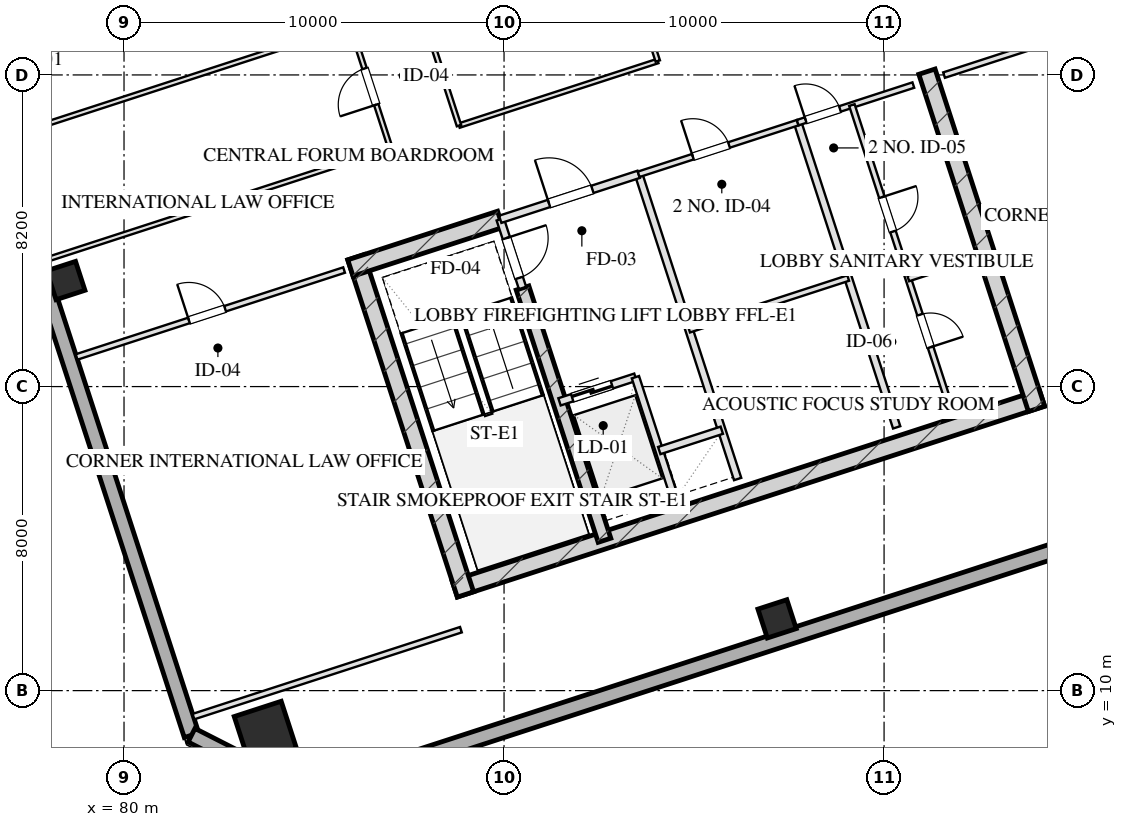
"""IFC4 building model, lengths in metres.
Left out: names, types, materials, properties, quantities, classifications, styles, units other than length and angle.
Written with IfcOpenShell. Run it as: python <this file> out.ifc"""

import sys

from ifc_helpers import new_model, si_unit, direction, frame, frame_2d, origin, origin_2d, place, context, subcontext, project, spatial, rectangle, hollow_rectangle, extrude, element, fill, save


model = new_model("IFC4")
c1 = context("Model", 3, precision=1e-05, world=origin(), true_north=direction((0.0, 1.0)))
c2 = subcontext(c1, "Body", "Model", "MODEL_VIEW")
j1 = project(units=[si_unit("LENGTHUNIT", "METRE"), si_unit("PLANEANGLEUNIT", "RADIAN")], contexts=[c1])
p1 = place(None, origin())
s1 = spatial("IfcSite", under=j1, at=p1, CompositionType="ELEMENT")
p2 = place(p1, origin())
s2 = spatial("IfcBuilding", under=s1, at=p2, CompositionType="ELEMENT")
p3 = place(p2, frame((0.0, 0.0, 188.6)))
s3 = spatial("IfcBuildingStorey", under=s2, at=p3, CompositionType="ELEMENT", Elevation=188.6)
p4 = place(p3, frame((88.701, 12.675, 0.0), z_axis=(0.0, 0.0, 1.0), x_axis=(0.95105824505, 0.309011673763, 0.0)))
e1 = element("IfcWall", 1, at=p4, inside=s3, PredefinedType="SHEAR", context=c2, shape_type="SweptSolid", body=[
    extrude(rectangle(XDim=16.25, YDim=0.45, at=frame_2d((8.125, 0.0))), origin(), (0.0, 0.0, 1.0), 3.45),
])
for number, where, z_axis, x_axis in (
    (2, (86.102, 21.404, 0.0), (0.0, 0.0, 1.0), (0.309, -0.951, 0.0)),
    (3, (101.128, 26.286, 0.0), (0.0, 0.0, 1.0), (0.309, -0.951, 0.0)),
):
    element("IfcWall", number, at=place(p3, frame(where, z_axis=z_axis, x_axis=x_axis)), inside=s3, PredefinedType="SHEAR", context=c2, shape_type="SweptSolid", body=[
        extrude(rectangle(XDim=9.33, YDim=0.45, at=frame_2d((4.665, 0.0))), origin(), (0.0, 0.0, 1.0), 3.45),
    ])
p5 = place(p3, frame((90.486, 20.594, 0.0), z_axis=(0.0, 0.0, 1.0), x_axis=(0.309020428229, -0.951055400562, 0.0)))
e4 = element("IfcWall", 4, at=p5, inside=s3, PredefinedType="SHEAR", context=c2, shape_type="SweptSolid", body=[
    extrude(rectangle(XDim=6.98, YDim=0.35, at=frame_2d((3.49, 0.0))), origin(), (0.0, 0.0, 1.0), 3.45),
])
p6 = place(p3, frame((85.957, 21.12, 0.0), z_axis=(0.0, 0.0, 1.0), x_axis=(0.951064796122, 0.308991510526, 0.0)))
e5 = element("IfcWall", 5, at=p6, inside=s3, PredefinedType="SHEAR", context=c2, shape_type="SweptSolid", body=[
    extrude(rectangle(XDim=4.145, YDim=0.45, at=frame_2d((2.073, 0.0))), origin(), (0.0, 0.0, 1.0), 3.45),
])
p7 = place(p3, frame((83.719, 8.901, 0.0), z_axis=(0.0, 0.0, 1.0), x_axis=(0.951056516295, 0.309016994375, 0.0)))
e6 = element("IfcColumn", 6, at=p7, inside=s3, PredefinedType="COLUMN", context=c2, shape_type="SweptSolid", body=[
    extrude(hollow_rectangle(XDim=1.3, YDim=1.3, WallThickness=0.045, at=origin_2d()), origin(), (0.0, 0.0, 1.0), 3.451),
])
for number, where, z_axis, x_axis in (
    (7, (78.468, 20.79, 0.0), (0.0, 0.0, 1.0), (0.951, 0.309, 0.0)),
    (8, (97.185, 11.888, 0.0), (0.0, 0.0, 1.0), (0.951, 0.309, 0.0)),
):
    element("IfcColumn", number, at=place(p3, frame(where, z_axis=z_axis, x_axis=x_axis)), inside=s3, PredefinedType="COLUMN", context=c2, shape_type="SweptSolid", body=[
        extrude(hollow_rectangle(XDim=0.8, YDim=0.8, WallThickness=0.028, at=origin_2d()), origin(), (0.0, 0.0, 1.0), 3.451),
    ])
p8 = place(p3, frame((81.776, 8.827, 0.0), z_axis=(0.0, 0.0, 1.0), x_axis=(-0.309014228706, 0.951057414911, 0.0)))
e9 = element("IfcWall", 9, at=p8, inside=s3, PredefinedType="SOLIDWALL", context=c2, shape_type="SweptSolid", body=[
    extrude(rectangle(XDim=42.8, YDim=0.4, at=frame_2d((21.4, 0.0))), origin(), (0.0, 0.0, 1.0), 2.61),
])
p9 = place(p8, frame((22.95, 0.0, 0.75)))
e10 = element("IfcOpeningElement", 10, at=p9, cuts=e9, PredefinedType="OPENING", context=c2, shape_type="SweptSolid", body=[
    extrude(rectangle(XDim=2.1, YDim=1.46, at=frame_2d((1.05, 0.73))), frame((0.0, 0.21, 0.0), z_axis=(0.0, -1.0, 0.0), x_axis=(1.0, 0.0, 0.0)), (0.0, 0.0, 1.0), 0.42),
])
p10 = place(p8, frame((26.75, 0.0, 0.75)))
e11 = element("IfcOpeningElement", 11, at=p10, cuts=e9, PredefinedType="OPENING", context=c2, shape_type="SweptSolid", body=[
    extrude(rectangle(XDim=2.1, YDim=1.46, at=frame_2d((1.05, 0.73))), frame((0.0, 0.21, 0.0), z_axis=(0.0, -1.0, 0.0), x_axis=(1.0, 0.0, 0.0)), (0.0, 0.0, 1.0), 0.42),
])
p11 = place(p8, frame((17.787, 0.0, 0.0)))
e12 = element("IfcOpeningElement", 12, at=p11, cuts=e9, PredefinedType="OPENING", context=c2, shape_type="SweptSolid", body=[
    extrude(rectangle(XDim=1.1, YDim=2.15, at=frame_2d((0.55, 1.075))), frame((0.0, 0.21, 0.0), z_axis=(0.0, -1.0, 0.0), x_axis=(1.0, 0.0, 0.0)), (0.0, 0.0, 1.0), 0.42),
])
p12 = place(p3, frame((98.224, 59.173, 0.0), z_axis=(0.0, 0.0, 1.0), x_axis=(0.309014228706, -0.951057414911, 0.0)))
e13 = element("IfcWall", 13, at=p12, inside=s3, PredefinedType="SOLIDWALL", context=c2, shape_type="SweptSolid", body=[
    extrude(rectangle(XDim=42.8, YDim=0.4, at=frame_2d((21.4, 0.0))), origin(), (0.0, 0.0, 1.0), 2.61),
])
p13 = place(p12, frame((17.75, 0.0, 0.75)))
e14 = element("IfcOpeningElement", 14, at=p13, cuts=e13, PredefinedType="OPENING", context=c2, shape_type="SweptSolid", body=[
    extrude(rectangle(XDim=2.1, YDim=1.46, at=frame_2d((1.05, 0.73))), frame((0.0, 0.21, 0.0), z_axis=(0.0, -1.0, 0.0), x_axis=(1.0, 0.0, 0.0)), (0.0, 0.0, 1.0), 0.42),
])
p14 = place(p12, frame((13.95, 0.0, 0.75)))
e15 = element("IfcOpeningElement", 15, at=p14, cuts=e13, PredefinedType="OPENING", context=c2, shape_type="SweptSolid", body=[
    extrude(rectangle(XDim=2.1, YDim=1.46, at=frame_2d((1.05, 0.73))), frame((0.0, 0.21, 0.0), z_axis=(0.0, -1.0, 0.0), x_axis=(1.0, 0.0, 0.0)), (0.0, 0.0, 1.0), 0.42),
])
p15 = place(p12, frame((23.95, 0.0, 0.0)))
e16 = element("IfcOpeningElement", 16, at=p15, cuts=e13, PredefinedType="OPENING", context=c2, shape_type="SweptSolid", body=[
    extrude(rectangle(XDim=1.1, YDim=2.15, at=frame_2d((0.55, 1.075))), frame((0.0, 0.21, 0.0), z_axis=(0.0, -1.0, 0.0), x_axis=(1.0, 0.0, 0.0)), (0.0, 0.0, 1.0), 0.42),
])
p16 = place(p3, frame((109.908, 15.444, 0.0), z_axis=(0.0, 0.0, 1.0), x_axis=(-0.951057580055, -0.30901372044, 0.0)))
e17 = element("IfcWall", 17, at=p16, inside=s3, PredefinedType="SOLIDWALL", context=c2, shape_type="SweptSolid", body=[
    extrude(rectangle(XDim=26.4, YDim=0.4, at=frame_2d((13.2, 0.0))), origin(), (0.0, 0.0, 1.0), 2.61),
])
p17 = place(p3, frame((84.801, 7.286, 0.0), z_axis=(0.0, 0.0, 1.0), x_axis=(-0.891020832027, 0.453962417932, 0.0)))
e18 = element("IfcWall", 18, at=p17, inside=s3, PredefinedType="SOLIDWALL", context=c2, shape_type="SweptSolid", body=[
    extrude(rectangle(XDim=3.394, YDim=0.4, at=frame_2d((1.697, 0.0))), origin(), (0.0, 0.0, 1.0), 2.61),
])
p18 = place(p3, frame((89.899, 22.401, 0.0), z_axis=(0.0, 0.0, 1.0), x_axis=(0.308932062672, -0.951084108086, 0.0)))
e19 = element("IfcWall", 19, at=p18, inside=s3, PredefinedType="PARTITIONING", context=c2, shape_type="SweptSolid", body=[
    extrude(rectangle(XDim=1.9, YDim=0.2, at=frame_2d((0.95, 0.0))), origin(), (0.0, 0.0, 1.0), 3.175),
])
p19 = place(p18, frame((0.52, 0.0, 0.0)))
e20 = element("IfcOpeningElement", 20, at=p19, cuts=e19, PredefinedType="OPENING", context=c2, shape_type="SweptSolid", body=[
    extrude(rectangle(XDim=1.1, YDim=2.05, at=frame_2d((0.55, 1.025))), frame((0.0, 0.11, 0.0), z_axis=(0.0, -1.0, 0.0), x_axis=(1.0, 0.0, 0.0)), (0.0, 0.0, 1.0), 0.22),
])
p20 = place(p3, frame((93.542, 23.585, 0.0), z_axis=(0.0, 0.0, 1.0), x_axis=(0.309042196757, -0.951048327176, 0.0)))
e21 = element("IfcWall", 21, at=p20, inside=s3, PredefinedType="PARTITIONING", context=c2, shape_type="SweptSolid", body=[
    extrude(rectangle(XDim=8.43, YDim=0.2, at=frame_2d((4.215, 0.0))), origin(), (0.0, 0.0, 1.0), 3.175),
])
p21 = place(p3, frame((89.899, 22.401, 0.0), z_axis=(0.0, 0.0, 1.0), x_axis=(0.951046716504, 0.309047153403, 0.0)))
e22 = element("IfcWall", 22, at=p21, inside=s3, PredefinedType="PARTITIONING", context=c2, shape_type="SweptSolid", body=[
    extrude(rectangle(XDim=3.83, YDim=0.2, at=frame_2d((1.915, 0.0))), origin(), (0.0, 0.0, 1.0), 3.175),
])
p22 = place(p21, frame((1.35, 0.0, 0.0)))
e23 = element("IfcOpeningElement", 23, at=p22, cuts=e22, PredefinedType="OPENING", context=c2, shape_type="SweptSolid", body=[
    extrude(rectangle(XDim=1.2, YDim=2.05, at=frame_2d((0.6, 1.025))), frame((0.0, 0.11, 0.0), z_axis=(0.0, -1.0, 0.0), x_axis=(1.0, 0.0, 0.0)), (0.0, 0.0, 1.0), 0.22),
])
p23 = place(p3, frame((91.46, 17.598, 0.0), z_axis=(0.0, 0.0, 1.0), x_axis=(0.951062257173, 0.308999325213, 0.0)))
e24 = element("IfcWall", 24, at=p23, inside=s3, PredefinedType="PARTITIONING", context=c2, shape_type="SweptSolid", body=[
    extrude(rectangle(XDim=2.1, YDim=0.2, at=frame_2d((1.05, 0.0))), origin(), (0.0, 0.0, 1.0), 3.175),
])
p24 = place(p23, frame((0.35, 0.0, 0.0)))
e25 = element("IfcOpeningElement", 25, at=p24, cuts=e24, PredefinedType="OPENING", context=c2, shape_type="SweptSolid", body=[
    extrude(rectangle(XDim=1.1, YDim=2.05, at=frame_2d((0.55, 1.025))), frame((0.0, 0.11, 0.0), z_axis=(0.0, -1.0, 0.0), x_axis=(1.0, 0.0, 0.0)), (0.0, 0.0, 1.0), 0.22),
])
p25 = place(p3, frame((93.457, 18.247, 0.0), z_axis=(0.0, 0.0, 1.0), x_axis=(0.3089935693, -0.951064127245, 0.0)))
e26 = element("IfcWall", 26, at=p25, inside=s3, PredefinedType="PARTITIONING", context=c2, shape_type="SweptSolid", body=[
    extrude(rectangle(XDim=3.7, YDim=0.2, at=frame_2d((1.85, 0.0))), origin(), (0.0, 0.0, 1.0), 3.175),
])
p26 = place(p3, frame((94.084, 16.317, 0.0), z_axis=(0.0, 0.0, 1.0), x_axis=(0.951041328149, 0.309063734775, 0.0)))
e27 = element("IfcWall", 27, at=p26, inside=s3, PredefinedType="PARTITIONING", context=c2, shape_type="SweptSolid", body=[
    extrude(rectangle(XDim=1.73, YDim=0.2, at=frame_2d((0.865, 0.0))), origin(), (0.0, 0.0, 1.0), 3.175),
])
p27 = place(p3, frame((97.727, 24.944, 0.0), z_axis=(0.0, 0.0, 1.0), x_axis=(0.309016001439, -0.951056838919, 0.0)))
e28 = element("IfcWall", 28, at=p27, inside=s3, PredefinedType="PARTITIONING", context=c2, shape_type="SweptSolid", body=[
    extrude(rectangle(XDim=8.43, YDim=0.2, at=frame_2d((4.215, 0.0))), origin(), (0.0, 0.0, 1.0), 3.175),
])
p28 = place(p3, frame((93.542, 23.585, 0.0), z_axis=(0.0, 0.0, 1.0), x_axis=(0.951063829732, 0.308994485023, 0.0)))
e29 = element("IfcWall", 29, at=p28, inside=s3, PredefinedType="PARTITIONING", context=c2, shape_type="SweptSolid", body=[
    extrude(rectangle(XDim=4.4, YDim=0.15, at=frame_2d((2.2, 0.0))), origin(), (0.0, 0.0, 1.0), 3.175),
])
p29 = place(p28, frame((1.5, 0.0, 0.0)))
e30 = element("IfcOpeningElement", 30, at=p29, cuts=e29, PredefinedType="OPENING", context=c2, shape_type="SweptSolid", body=[
    extrude(rectangle(XDim=1.0, YDim=2.05, at=frame_2d((0.5, 1.025))), frame((0.0, 0.085, 0.0), z_axis=(0.0, -1.0, 0.0), x_axis=(1.0, 0.0, 0.0)), (0.0, 0.0, 1.0), 0.17),
])
p30 = place(p3, frame((94.871, 19.495, 0.0), z_axis=(0.0, 0.0, 1.0), x_axis=(0.951042223598, 0.309060979314, 0.0)))
e31 = element("IfcWall", 31, at=p30, inside=s3, PredefinedType="PARTITIONING", context=c2, shape_type="SweptSolid", body=[
    extrude(rectangle(XDim=4.4, YDim=0.15, at=frame_2d((2.2, 0.0))), origin(), (0.0, 0.0, 1.0), 3.175),
])
p31 = place(p3, frame((97.727, 24.944, 0.0), z_axis=(0.0, 0.0, 1.0), x_axis=(0.951036872128, 0.309077446369, 0.0)))
e32 = element("IfcWall", 32, at=p31, inside=s3, PredefinedType="PARTITIONING", context=c2, shape_type="SweptSolid", body=[
    extrude(rectangle(XDim=3.2, YDim=0.15, at=frame_2d((1.6, 0.0))), origin(), (0.0, 0.0, 1.0), 3.175),
])
p32 = place(p31, frame((0.22, 0.0, 0.0)))
e33 = element("IfcOpeningElement", 33, at=p32, cuts=e32, PredefinedType="OPENING", context=c2, shape_type="SweptSolid", body=[
    extrude(rectangle(XDim=0.95, YDim=2.05, at=frame_2d((0.475, 1.025))), frame((0.0, 0.085, 0.0), z_axis=(0.0, -1.0, 0.0), x_axis=(1.0, 0.0, 0.0)), (0.0, 0.0, 1.0), 0.17),
])
p33 = place(p3, frame((99.153, 25.408, 0.0), z_axis=(0.0, 0.0, 1.0), x_axis=(0.309016001439, -0.951056838919, 0.0)))
e34 = element("IfcWall", 34, at=p33, inside=s3, PredefinedType="PARTITIONING", context=c2, shape_type="SweptSolid", body=[
    extrude(rectangle(XDim=8.43, YDim=0.15, at=frame_2d((4.215, 0.0))), origin(), (0.0, 0.0, 1.0), 3.175),
])
p34 = place(p33, frame((2.55, 0.0, 0.0)))
e35 = element("IfcOpeningElement", 35, at=p34, cuts=e34, PredefinedType="OPENING", context=c2, shape_type="SweptSolid", body=[
    extrude(rectangle(XDim=0.95, YDim=2.05, at=frame_2d((0.475, 1.025))), frame((0.0, 0.085, 0.0), z_axis=(0.0, -1.0, 0.0), x_axis=(1.0, 0.0, 0.0)), (0.0, 0.0, 1.0), 0.17),
])
p35 = place(p33, frame((5.8, 0.0, 0.0)))
e36 = element("IfcOpeningElement", 36, at=p35, cuts=e34, PredefinedType="OPENING", context=c2, shape_type="SweptSolid", body=[
    extrude(rectangle(XDim=0.9, YDim=2.05, at=frame_2d((0.45, 1.025))), frame((0.0, 0.085, 0.0), z_axis=(0.0, -1.0, 0.0), x_axis=(1.0, 0.0, 0.0)), (0.0, 0.0, 1.0), 0.17),
])
p36 = place(p3, frame((100.636, 20.843, 0.0), z_axis=(0.0, 0.0, 1.0), x_axis=(0.951040401051, 0.309066587596, 0.0)))
e37 = element("IfcWall", 37, at=p36, inside=s3, PredefinedType="PARTITIONING", context=c2, shape_type="SweptSolid", body=[
    extrude(rectangle(XDim=1.7, YDim=0.15, at=frame_2d((0.85, 0.0))), origin(), (0.0, 0.0, 1.0), 3.175),
])
p37 = place(p3, frame((81.828, 9.316, 0.0), z_axis=(0.0, 0.0, 1.0), x_axis=(0.95105128112, 0.309033106124, 0.0)))
e38 = element("IfcWall", 38, at=p37, inside=s3, PredefinedType="PARTITIONING", context=c2, shape_type="SweptSolid", body=[
    extrude(rectangle(XDim=7.4, YDim=0.15, at=frame_2d((3.7, 0.0))), origin(), (0.0, 0.0, 1.0), 3.175),
])
p38 = place(p3, frame((78.753, 18.78, 0.0), z_axis=(0.0, 0.0, 1.0), x_axis=(0.951060977215, 0.309003264738, 0.0)))
e39 = element("IfcWall", 39, at=p38, inside=s3, PredefinedType="PARTITIONING", context=c2, shape_type="SweptSolid", body=[
    extrude(rectangle(XDim=7.4, YDim=0.15, at=frame_2d((3.7, 0.0))), origin(), (0.0, 0.0, 1.0), 3.175),
])
p39 = place(p38, frame((3.108, 0.0, 0.0)))
e40 = element("IfcOpeningElement", 40, at=p39, cuts=e39, PredefinedType="OPENING", context=c2, shape_type="SweptSolid", body=[
    extrude(rectangle(XDim=1.0, YDim=2.05, at=frame_2d((0.5, 1.025))), frame((0.0, 0.085, 0.0), z_axis=(0.0, -1.0, 0.0), x_axis=(1.0, 0.0, 0.0)), (0.0, 0.0, 1.0), 0.17),
])
p40 = place(p3, frame((101.578, 26.196, 0.0), z_axis=(0.0, 0.0, 1.0), x_axis=(0.951064934653, 0.308991084134, 0.0)))
e41 = element("IfcWall", 41, at=p40, inside=s3, PredefinedType="PARTITIONING", context=c2, shape_type="SweptSolid", body=[
    extrude(rectangle(XDim=6.8, YDim=0.15, at=frame_2d((3.4, 0.0))), origin(), (0.0, 0.0, 1.0), 3.175),
])
p41 = place(p40, frame((2.856, 0.0, 0.0)))
e42 = element("IfcOpeningElement", 42, at=p41, cuts=e41, PredefinedType="OPENING", context=c2, shape_type="SweptSolid", body=[
    extrude(rectangle(XDim=1.0, YDim=2.05, at=frame_2d((0.5, 1.025))), frame((0.0, 0.085, 0.0), z_axis=(0.0, -1.0, 0.0), x_axis=(1.0, 0.0, 0.0)), (0.0, 0.0, 1.0), 0.17),
])
p42 = place(p3, frame((77.925, 21.328, 0.0), z_axis=(0.0, 0.0, 1.0), x_axis=(0.951053980838, 0.309024797601, 0.0)))
e43 = element("IfcWall", 43, at=p42, inside=s3, PredefinedType="PARTITIONING", context=c2, shape_type="SweptSolid", body=[
    extrude(rectangle(XDim=9.55, YDim=0.12, at=frame_2d((4.775, 0.0))), origin(), (0.0, 0.0, 1.0), 3.175),
])
p43 = place(p3, frame((88.814, 24.867, 0.0), z_axis=(0.0, 0.0, 1.0), x_axis=(0.951061793147, 0.309000753423, 0.0)))
e44 = element("IfcWall", 44, at=p43, inside=s3, PredefinedType="PARTITIONING", context=c2, shape_type="SweptSolid", body=[
    extrude(rectangle(XDim=5.5, YDim=0.12, at=frame_2d((2.75, 0.0))), origin(), (0.0, 0.0, 1.0), 3.175),
])
p44 = place(p3, frame((87.007, 24.28, 0.0), z_axis=(0.0, 0.0, 1.0), x_axis=(-0.309022042254, 0.951054876125, 0.0)))
e45 = element("IfcWall", 45, at=p44, inside=s3, PredefinedType="PARTITIONING", context=c2, shape_type="SweptSolid", body=[
    extrude(rectangle(XDim=16.64, YDim=0.12, at=frame_2d((8.32, 0.0))), origin(), (0.0, 0.0, 1.0), 3.175),
])
p45 = place(p44, frame((1.197, 0.0, 0.0)))
e46 = element("IfcOpeningElement", 46, at=p45, cuts=e45, PredefinedType="OPENING", context=c2, shape_type="SweptSolid", body=[
    extrude(rectangle(XDim=1.0, YDim=2.05, at=frame_2d((0.5, 1.025))), frame((0.0, 0.07, 0.0), z_axis=(0.0, -1.0, 0.0), x_axis=(1.0, 0.0, 0.0)), (0.0, 0.0, 1.0), 0.14),
])
p46 = place(p44, frame((4.891, 0.0, 0.0)))
e47 = element("IfcOpeningElement", 47, at=p46, cuts=e45, PredefinedType="OPENING", context=c2, shape_type="SweptSolid", body=[
    extrude(rectangle(XDim=1.0, YDim=2.05, at=frame_2d((0.5, 1.025))), frame((0.0, 0.07, 0.0), z_axis=(0.0, -1.0, 0.0), x_axis=(1.0, 0.0, 0.0)), (0.0, 0.0, 1.0), 0.14),
])
p47 = place(p44, frame((9.354, 0.0, 0.0)))
e48 = element("IfcOpeningElement", 48, at=p47, cuts=e45, PredefinedType="OPENING", context=c2, shape_type="SweptSolid", body=[
    extrude(rectangle(XDim=1.0, YDim=2.05, at=frame_2d((0.5, 1.025))), frame((0.0, 0.07, 0.0), z_axis=(0.0, -1.0, 0.0), x_axis=(1.0, 0.0, 0.0)), (0.0, 0.0, 1.0), 0.14),
])
p48 = place(p44, frame((13.98, 0.0, 0.0)))
e49 = element("IfcOpeningElement", 49, at=p48, cuts=e45, PredefinedType="OPENING", context=c2, shape_type="SweptSolid", body=[
    extrude(rectangle(XDim=1.0, YDim=2.05, at=frame_2d((0.5, 1.025))), frame((0.0, 0.07, 0.0), z_axis=(0.0, -1.0, 0.0), x_axis=(1.0, 0.0, 0.0)), (0.0, 0.0, 1.0), 0.14),
])
p49 = place(p3, frame((88.814, 24.867, 0.0), z_axis=(0.0, 0.0, 1.0), x_axis=(-0.309022042254, 0.951054876125, 0.0)))
e50 = element("IfcWall", 50, at=p49, inside=s3, PredefinedType="PARTITIONING", context=c2, shape_type="SweptSolid", body=[
    extrude(rectangle(XDim=16.64, YDim=0.12, at=frame_2d((8.32, 0.0))), origin(), (0.0, 0.0, 1.0), 3.175),
])
p50 = place(p49, frame((3.438, 0.0, 0.0)))
e51 = element("IfcOpeningElement", 51, at=p50, cuts=e50, PredefinedType="OPENING", context=c2, shape_type="SweptSolid", body=[
    extrude(rectangle(XDim=1.1, YDim=2.05, at=frame_2d((0.55, 1.025))), frame((0.0, 0.07, 0.0), z_axis=(0.0, -1.0, 0.0), x_axis=(1.0, 0.0, 0.0)), (0.0, 0.0, 1.0), 0.14),
])
p51 = place(p49, frame((11.69, 0.0, 0.0)))
e52 = element("IfcOpeningElement", 52, at=p51, cuts=e50, PredefinedType="OPENING", context=c2, shape_type="SweptSolid", body=[
    extrude(rectangle(XDim=1.1, YDim=2.05, at=frame_2d((0.55, 1.025))), frame((0.0, 0.07, 0.0), z_axis=(0.0, -1.0, 0.0), x_axis=(1.0, 0.0, 0.0)), (0.0, 0.0, 1.0), 0.14),
])
p52 = place(p3, frame((94.045, 26.566, 0.0), z_axis=(0.0, 0.0, 1.0), x_axis=(-0.30901773025, 0.951056277195, 0.0)))
e53 = element("IfcWall", 53, at=p52, inside=s3, PredefinedType="PARTITIONING", context=c2, shape_type="SweptSolid", body=[
    extrude(rectangle(XDim=16.64, YDim=0.12, at=frame_2d((8.32, 0.0))), origin(), (0.0, 0.0, 1.0), 3.175),
])
p53 = place(p3, frame((76.876, 24.557, 0.0), z_axis=(0.0, 0.0, 1.0), x_axis=(0.951056422073, 0.309017284359, 0.0)))
e54 = element("IfcWall", 54, at=p53, inside=s3, PredefinedType="PARTITIONING", context=c2, shape_type="SweptSolid", body=[
    extrude(rectangle(XDim=9.55, YDim=0.12, at=frame_2d((4.775, 0.0))), origin(), (0.0, 0.0, 1.0), 3.175),
])
p54 = place(p19, origin())
e55 = element("IfcDoor", 55, at=p54, inside=s3, OperationType="SINGLE_SWING_LEFT", PredefinedType="DOOR", context=c2, shape_type="SweptSolid", body=[
    extrude(rectangle(XDim=1.1, YDim=2.05, at=frame_2d((0.55, 1.025))), frame((0.0, 0.025, 0.0), z_axis=(0.0, -1.0, 0.0), x_axis=(1.0, 0.0, 0.0)), (0.0, 0.0, 1.0), 0.05),
])
fill(e20, e55)
p55 = place(p22, origin())
e56 = element("IfcDoor", 56, at=p55, inside=s3, OperationType="SINGLE_SWING_LEFT", PredefinedType="DOOR", context=c2, shape_type="SweptSolid", body=[
    extrude(rectangle(XDim=1.2, YDim=2.05, at=frame_2d((0.6, 1.025))), frame((0.0, 0.025, 0.0), z_axis=(0.0, -1.0, 0.0), x_axis=(1.0, 0.0, 0.0)), (0.0, 0.0, 1.0), 0.05),
])
fill(e23, e56)
p56 = place(p24, origin())
e57 = element("IfcDoor", 57, at=p56, inside=s3, OperationType="DOUBLE_DOOR_SLIDING", PredefinedType="DOOR", context=c2, shape_type="SweptSolid", body=[
    extrude(rectangle(XDim=1.1, YDim=2.05, at=frame_2d((0.55, 1.025))), frame((0.0, 0.025, 0.0), z_axis=(0.0, -1.0, 0.0), x_axis=(1.0, 0.0, 0.0)), (0.0, 0.0, 1.0), 0.05),
])
fill(e25, e57)
p57 = place(p29, origin())
e58 = element("IfcDoor", 58, at=p57, inside=s3, OperationType="SINGLE_SWING_LEFT", PredefinedType="DOOR", context=c2, shape_type="SweptSolid", body=[
    extrude(rectangle(XDim=1.0, YDim=2.05, at=frame_2d((0.5, 1.025))), frame((0.0, 0.025, 0.0), z_axis=(0.0, -1.0, 0.0), x_axis=(1.0, 0.0, 0.0)), (0.0, 0.0, 1.0), 0.05),
])
fill(e30, e58)
p58 = place(p32, origin())
e59 = element("IfcDoor", 59, at=p58, inside=s3, OperationType="SINGLE_SWING_LEFT", PredefinedType="DOOR", context=c2, shape_type="SweptSolid", body=[
    extrude(rectangle(XDim=0.95, YDim=2.05, at=frame_2d((0.475, 1.025))), frame((0.0, 0.025, 0.0), z_axis=(0.0, -1.0, 0.0), x_axis=(1.0, 0.0, 0.0)), (0.0, 0.0, 1.0), 0.05),
])
fill(e33, e59)
p59 = place(p34, origin())
e60 = element("IfcDoor", 60, at=p59, inside=s3, OperationType="SINGLE_SWING_LEFT", PredefinedType="DOOR", context=c2, shape_type="SweptSolid", body=[
    extrude(rectangle(XDim=0.95, YDim=2.05, at=frame_2d((0.475, 1.025))), frame((0.0, 0.025, 0.0), z_axis=(0.0, -1.0, 0.0), x_axis=(1.0, 0.0, 0.0)), (0.0, 0.0, 1.0), 0.05),
])
fill(e35, e60)
p60 = place(p35, origin())
e61 = element("IfcDoor", 61, at=p60, inside=s3, OperationType="SINGLE_SWING_RIGHT", PredefinedType="DOOR", context=c2, shape_type="SweptSolid", body=[
    extrude(rectangle(XDim=0.9, YDim=2.05, at=frame_2d((0.45, 1.025))), frame((0.0, 0.025, 0.0), z_axis=(0.0, -1.0, 0.0), x_axis=(1.0, 0.0, 0.0)), (0.0, 0.0, 1.0), 0.05),
])
fill(e36, e61)
p61 = place(p39, origin())
e62 = element("IfcDoor", 62, at=p61, inside=s3, OperationType="SINGLE_SWING_LEFT", PredefinedType="DOOR", context=c2, shape_type="SweptSolid", body=[
    extrude(rectangle(XDim=1.0, YDim=2.05, at=frame_2d((0.5, 1.025))), frame((0.0, 0.025, 0.0), z_axis=(0.0, -1.0, 0.0), x_axis=(1.0, 0.0, 0.0)), (0.0, 0.0, 1.0), 0.05),
])
fill(e40, e62)
p62 = place(p45, origin())
e63 = element("IfcDoor", 63, at=p62, inside=s3, OperationType="SINGLE_SWING_LEFT", PredefinedType="DOOR", context=c2, shape_type="SweptSolid", body=[
    extrude(rectangle(XDim=1.0, YDim=2.05, at=frame_2d((0.5, 1.025))), frame((0.0, 0.025, 0.0), z_axis=(0.0, -1.0, 0.0), x_axis=(1.0, 0.0, 0.0)), (0.0, 0.0, 1.0), 0.05),
])
fill(e46, e63)
save(model, sys.argv[1])
